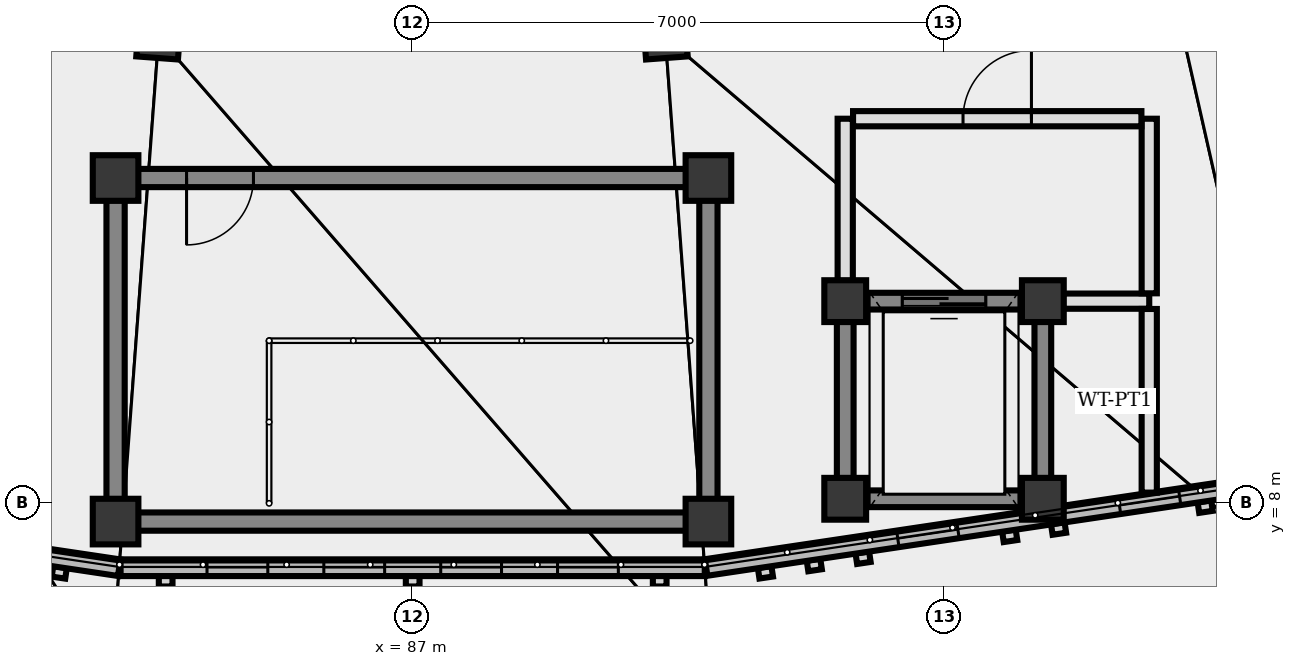
"""IFC4 building model, lengths in metres.
Left out: names, types, materials, properties, quantities, classifications, styles, units other than length and angle.
Written with IfcOpenShell. Run it as: python <this file> out.ifc"""

import sys

from ifc_helpers import new_model, si_unit, direction, frame, frame_2d, origin, origin_2d, place, context, subcontext, project, spatial, rectangle, extrude, element, fill, save


model = new_model("IFC4")
c1 = context("Model", 3, precision=1e-05, world=origin(), true_north=direction((0.0, 1.0)))
c2 = subcontext(c1, "Body", "Model", "MODEL_VIEW")
j1 = project(units=[si_unit("LENGTHUNIT", "METRE"), si_unit("PLANEANGLEUNIT", "RADIAN")], contexts=[c1])
p1 = place(None, origin())
s1 = spatial("IfcSite", under=j1, at=p1, CompositionType="ELEMENT")
p2 = place(p1, origin())
s2 = spatial("IfcBuilding", under=s1, at=p2, CompositionType="ELEMENT")
p3 = place(p2, frame((0.0, 0.0, 12.5)))
s3 = spatial("IfcBuildingStorey", under=s2, at=p3, CompositionType="ELEMENT", Elevation=12.5)
for number, where, z_axis, x_axis in (
    (1, (83.1, 7.75, 0.0), (0.0, 0.0, 1.0), (1.0, 0.0, 0.0)),
    (2, (90.9, 7.75, 0.0), (0.0, 0.0, 1.0), (1.0, 0.0, 0.0)),
):
    element("IfcColumn", number, at=place(p3, frame(where, z_axis=z_axis, x_axis=x_axis)), inside=s3, PredefinedType="COLUMN", context=c2, shape_type="SweptSolid", body=[
        extrude(rectangle(XDim=0.6, YDim=0.6, at=origin_2d()), origin(), (0.0, 0.0, 1.0), 4.15),
    ])
for number, where, z_axis, x_axis in (
    (3, (90.9, 12.27, 0.0), (0.0, 0.0, 1.0), (1.0, 0.0, 0.0)),
    (4, (83.1, 12.27, 0.0), (0.0, 0.0, 1.0), (1.0, 0.0, 0.0)),
):
    element("IfcColumn", number, at=place(p3, frame(where, z_axis=z_axis, x_axis=x_axis)), inside=s3, PredefinedType="COLUMN", context=c2, shape_type="SweptSolid", body=[
        extrude(rectangle(XDim=0.6, YDim=0.6, at=origin_2d()), origin(), (0.0, 0.0, 1.0), 3.178),
    ])
for number, where, z_axis, x_axis in (
    (5, (92.7, 8.05, 0.0), (0.0, 0.0, 1.0), (1.0, 0.0, 0.0)),
    (6, (95.3, 8.05, 0.0), (0.0, 0.0, 1.0), (1.0, 0.0, 0.0)),
):
    element("IfcColumn", number, at=place(p3, frame(where, z_axis=z_axis, x_axis=x_axis)), inside=s3, PredefinedType="COLUMN", context=c2, shape_type="SweptSolid", body=[
        extrude(rectangle(XDim=0.55, YDim=0.55, at=origin_2d()), origin(), (0.0, 0.0, 1.0), 4.0),
    ])
p4 = place(p3, frame((95.3, 10.65, 0.0), z_axis=(0.0, 0.0, 1.0), x_axis=(1.0, 0.0, 0.0)))
e7 = element("IfcColumn", 7, at=p4, inside=s3, PredefinedType="COLUMN", context=c2, shape_type="SweptSolid", body=[
    extrude(rectangle(XDim=0.55, YDim=0.55, at=origin_2d()), origin(), (0.0, 0.0, 1.0), 3.658),
])
p5 = place(p3, frame((92.7, 10.65, 0.0), z_axis=(0.0, 0.0, 1.0), x_axis=(1.0, 0.0, 0.0)))
e8 = element("IfcColumn", 8, at=p5, inside=s3, PredefinedType="COLUMN", context=c2, shape_type="SweptSolid", body=[
    extrude(rectangle(XDim=0.55, YDim=0.55, at=origin_2d()), origin(), (0.0, 0.0, 1.0), 3.573),
])
for number, where, z_axis, x_axis in (
    (9, (83.667, 14.124, 0.0), (0.0, 0.0, 1.0), (-0.074, -0.997, 0.0)),
    (10, (90.333, 14.124, 0.0), (0.0, 0.0, 1.0), (0.074, -0.997, 0.0)),
):
    element("IfcColumn", number, at=place(p3, frame(where, z_axis=z_axis, x_axis=x_axis)), inside=s3, PredefinedType="COLUMN", context=c2, shape_type="SweptSolid", body=[
        extrude(rectangle(XDim=0.55, YDim=0.55, at=origin_2d()), origin(), (0.0, 0.0, 1.0), 2.64),
    ])
p6 = place(p3, frame((83.148, 7.143, 0.0), z_axis=(0.0, 0.0, 1.0), x_axis=(-0.989027735747, 0.147729949309, 0.0)))
e11 = element("IfcWall", 11, at=p6, inside=s3, PredefinedType="SOLIDWALL", context=c2, shape_type="SweptSolid", body=[
    extrude(rectangle(XDim=7.392, YDim=0.22, at=frame_2d((3.696, 0.0))), origin(), (0.0, 0.0, 1.0), 3.85),
])
p7 = place(p6, frame((1.078, 0.0, 0.85)))
e12 = element("IfcOpeningElement", 12, at=p7, cuts=e11, PredefinedType="OPENING", context=c2, shape_type="SweptSolid", body=[
    extrude(rectangle(XDim=0.8, YDim=1.1, at=frame_2d((0.4, 0.55))), frame((0.0, 0.12, 0.0), z_axis=(0.0, -1.0, 0.0), x_axis=(1.0, 0.0, 0.0)), (0.0, 0.0, 1.0), 0.24),
])
p8 = place(p6, frame((2.557, 0.0, 0.85)))
e13 = element("IfcOpeningElement", 13, at=p8, cuts=e11, PredefinedType="OPENING", context=c2, shape_type="SweptSolid", body=[
    extrude(rectangle(XDim=0.8, YDim=1.1, at=frame_2d((0.4, 0.55))), frame((0.0, 0.12, 0.0), z_axis=(0.0, -1.0, 0.0), x_axis=(1.0, 0.0, 0.0)), (0.0, 0.0, 1.0), 0.24),
])
p9 = place(p6, frame((4.035, 0.0, 0.85)))
e14 = element("IfcOpeningElement", 14, at=p9, cuts=e11, PredefinedType="OPENING", context=c2, shape_type="SweptSolid", body=[
    extrude(rectangle(XDim=0.8, YDim=1.1, at=frame_2d((0.4, 0.55))), frame((0.0, 0.12, 0.0), z_axis=(0.0, -1.0, 0.0), x_axis=(1.0, 0.0, 0.0)), (0.0, 0.0, 1.0), 0.24),
])
p10 = place(p6, frame((5.514, 0.0, 0.85)))
e15 = element("IfcOpeningElement", 15, at=p10, cuts=e11, PredefinedType="OPENING", context=c2, shape_type="SweptSolid", body=[
    extrude(rectangle(XDim=0.8, YDim=1.1, at=frame_2d((0.4, 0.55))), frame((0.0, 0.12, 0.0), z_axis=(0.0, -1.0, 0.0), x_axis=(1.0, 0.0, 0.0)), (0.0, 0.0, 1.0), 0.24),
])
p11 = place(p3, frame((90.852, 7.143, 0.0), z_axis=(0.0, 0.0, 1.0), x_axis=(-1.0, 0.0, 0.0)))
e16 = element("IfcWall", 16, at=p11, inside=s3, PredefinedType="SOLIDWALL", context=c2, shape_type="SweptSolid", body=[
    extrude(rectangle(XDim=7.686, YDim=0.22, at=frame_2d((3.843, 0.0))), origin(), (0.0, 0.0, 1.0), 3.85),
])
p12 = place(p11, frame((1.137, 0.0, 0.85)))
e17 = element("IfcOpeningElement", 17, at=p12, cuts=e16, PredefinedType="OPENING", context=c2, shape_type="SweptSolid", body=[
    extrude(rectangle(XDim=0.8, YDim=1.1, at=frame_2d((0.4, 0.55))), frame((0.0, 0.12, 0.0), z_axis=(0.0, -1.0, 0.0), x_axis=(1.0, 0.0, 0.0)), (0.0, 0.0, 1.0), 0.24),
])
p13 = place(p11, frame((2.674, 0.0, 0.85)))
e18 = element("IfcOpeningElement", 18, at=p13, cuts=e16, PredefinedType="OPENING", context=c2, shape_type="SweptSolid", body=[
    extrude(rectangle(XDim=0.8, YDim=1.1, at=frame_2d((0.4, 0.55))), frame((0.0, 0.12, 0.0), z_axis=(0.0, -1.0, 0.0), x_axis=(1.0, 0.0, 0.0)), (0.0, 0.0, 1.0), 0.24),
])
p14 = place(p11, frame((4.212, 0.0, 0.85)))
e19 = element("IfcOpeningElement", 19, at=p14, cuts=e16, PredefinedType="OPENING", context=c2, shape_type="SweptSolid", body=[
    extrude(rectangle(XDim=0.8, YDim=1.1, at=frame_2d((0.4, 0.55))), frame((0.0, 0.12, 0.0), z_axis=(0.0, -1.0, 0.0), x_axis=(1.0, 0.0, 0.0)), (0.0, 0.0, 1.0), 0.24),
])
p15 = place(p11, frame((5.749, 0.0, 0.85)))
e20 = element("IfcOpeningElement", 20, at=p15, cuts=e16, PredefinedType="OPENING", context=c2, shape_type="SweptSolid", body=[
    extrude(rectangle(XDim=0.8, YDim=1.1, at=frame_2d((0.4, 0.55))), frame((0.0, 0.12, 0.0), z_axis=(0.0, -1.0, 0.0), x_axis=(1.0, 0.0, 0.0)), (0.0, 0.0, 1.0), 0.24),
])
p16 = place(p3, frame((98.163, 8.235, 0.0), z_axis=(0.0, 0.0, 1.0), x_axis=(-0.989032314976, -0.147699288869, 0.0)))
e21 = element("IfcWall", 21, at=p16, inside=s3, PredefinedType="SOLIDWALL", context=c2, shape_type="SweptSolid", body=[
    extrude(rectangle(XDim=7.374, YDim=0.22, at=frame_2d((3.687, 0.0))), origin(), (0.0, 0.0, 1.0), 3.85),
])
p17 = place(p16, frame((1.075, 0.0, 0.85)))
e22 = element("IfcOpeningElement", 22, at=p17, cuts=e21, PredefinedType="OPENING", context=c2, shape_type="SweptSolid", body=[
    extrude(rectangle(XDim=0.8, YDim=1.1, at=frame_2d((0.4, 0.55))), frame((0.0, 0.12, 0.0), z_axis=(0.0, -1.0, 0.0), x_axis=(1.0, 0.0, 0.0)), (0.0, 0.0, 1.0), 0.24),
])
p18 = place(p16, frame((4.024, 0.0, 0.85)))
e23 = element("IfcOpeningElement", 23, at=p18, cuts=e21, PredefinedType="OPENING", context=c2, shape_type="SweptSolid", body=[
    extrude(rectangle(XDim=0.8, YDim=1.1, at=frame_2d((0.4, 0.55))), frame((0.0, 0.12, 0.0), z_axis=(0.0, -1.0, 0.0), x_axis=(1.0, 0.0, 0.0)), (0.0, 0.0, 1.0), 0.24),
])
for number, where, z_axis, x_axis in (
    (24, (83.1, 8.042, 0.0), (0.0, 0.0, 1.0), (0.0, 1.0, 0.0)),
    (25, (90.9, 11.978, 0.0), (0.0, 0.0, 1.0), (0.0, -1.0, 0.0)),
):
    element("IfcWall", number, at=place(p3, frame(where, z_axis=z_axis, x_axis=x_axis)), inside=s3, PredefinedType="SHEAR", context=c2, shape_type="SweptSolid", body=[
        extrude(rectangle(XDim=3.936, YDim=0.24, at=frame_2d((1.968, 0.0))), origin(), (0.0, 0.0, 1.0), 3.344),
    ])
p19 = place(p3, frame((90.608, 7.75, 0.0), z_axis=(0.0, 0.0, 1.0), x_axis=(-1.0, 0.0, 0.0)))
e26 = element("IfcWall", 26, at=p19, inside=s3, PredefinedType="SHEAR", context=c2, shape_type="SweptSolid", body=[
    extrude(rectangle(XDim=7.216, YDim=0.24, at=frame_2d((3.608, 0.0))), origin(), (0.0, 0.0, 1.0), 3.74),
])
p20 = place(p3, frame((90.608, 12.27, 0.0), z_axis=(0.0, 0.0, 1.0), x_axis=(-1.0, 0.0, 0.0)))
e27 = element("IfcWall", 27, at=p20, inside=s3, PredefinedType="SHEAR", context=c2, shape_type="SweptSolid", body=[
    extrude(rectangle(XDim=7.216, YDim=0.24, at=frame_2d((3.608, 0.0))), origin(), (0.0, 0.0, 1.0), 3.273),
])
p21 = place(p20, frame((5.694, 0.0, 0.0)))
e28 = element("IfcOpeningElement", 28, at=p21, cuts=e27, PredefinedType="OPENING", context=c2, shape_type="SweptSolid", body=[
    extrude(rectangle(XDim=0.88, YDim=2.1, at=frame_2d((0.44, 1.05))), frame((0.0, 0.13, 0.0), z_axis=(0.0, -1.0, 0.0), x_axis=(1.0, 0.0, 0.0)), (0.0, 0.0, 1.0), 0.26),
])
p22 = place(p3, frame((92.967, 8.05, 0.0), z_axis=(0.0, 0.0, 1.0), x_axis=(1.0, 0.0, 0.0)))
e29 = element("IfcWall", 29, at=p22, inside=s3, PredefinedType="SHEAR", context=c2, shape_type="SweptSolid", body=[
    extrude(rectangle(XDim=2.066, YDim=0.22, at=frame_2d((1.033, 0.0))), origin(), (0.0, 0.0, 1.0), 3.74),
])
p23 = place(p3, frame((95.3, 8.317, 0.0), z_axis=(0.0, 0.0, 1.0), x_axis=(0.0, 1.0, 0.0)))
e30 = element("IfcWall", 30, at=p23, inside=s3, PredefinedType="SHEAR", context=c2, shape_type="SweptSolid", body=[
    extrude(rectangle(XDim=2.066, YDim=0.22, at=frame_2d((1.033, 0.0))), origin(), (0.0, 0.0, 1.0), 3.74),
])
p24 = place(p3, frame((95.033, 10.65, 0.0), z_axis=(0.0, 0.0, 1.0), x_axis=(-1.0, 0.0, 0.0)))
e31 = element("IfcWall", 31, at=p24, inside=s3, PredefinedType="SHEAR", context=c2, shape_type="SweptSolid", body=[
    extrude(rectangle(XDim=2.066, YDim=0.22, at=frame_2d((1.033, 0.0))), origin(), (0.0, 0.0, 1.0), 3.691),
])
p25 = place(p24, frame((0.483, 0.0, 0.0)))
e32 = element("IfcOpeningElement", 32, at=p25, cuts=e31, PredefinedType="OPENING", context=c2, shape_type="SweptSolid", body=[
    extrude(rectangle(XDim=1.1, YDim=2.15, at=frame_2d((0.55, 1.075))), frame((0.0, 0.12, 0.0), z_axis=(0.0, -1.0, 0.0), x_axis=(1.0, 0.0, 0.0)), (0.0, 0.0, 1.0), 0.24),
])
p26 = place(p3, frame((92.7, 10.383, 0.0), z_axis=(0.0, 0.0, 1.0), x_axis=(0.0, -1.0, 0.0)))
e33 = element("IfcWall", 33, at=p26, inside=s3, PredefinedType="SHEAR", context=c2, shape_type="SweptSolid", body=[
    extrude(rectangle(XDim=2.066, YDim=0.22, at=frame_2d((1.033, 0.0))), origin(), (0.0, 0.0, 1.0), 3.74),
])
p27 = place(p3, frame((92.7, 10.917, 0.0), z_axis=(0.0, 0.0, 1.0), x_axis=(0.0, 1.0, 0.0)))
e34 = element("IfcWall", 34, at=p27, inside=s3, PredefinedType="PARTITIONING", context=c2, shape_type="SweptSolid", body=[
    extrude(rectangle(XDim=2.133, YDim=0.2, at=frame_2d((1.066, 0.0))), origin(), (0.0, 0.0, 1.0), 3.145),
])
p28 = place(p3, frame((95.567, 10.65, 0.0), z_axis=(0.0, 0.0, 1.0), x_axis=(1.0, 0.0, 0.0)))
e35 = element("IfcWall", 35, at=p28, inside=s3, PredefinedType="PARTITIONING", context=c2, shape_type="SweptSolid", body=[
    extrude(rectangle(XDim=1.133, YDim=0.2, at=frame_2d((0.566, 0.0))), origin(), (0.0, 0.0, 1.0), 3.7),
])
p29 = place(p3, frame((96.7, 8.131, 0.0), z_axis=(0.0, 0.0, 1.0), x_axis=(0.0, 1.0, 0.0)))
e36 = element("IfcWall", 36, at=p29, inside=s3, PredefinedType="PARTITIONING", context=c2, shape_type="SweptSolid", body=[
    extrude(rectangle(XDim=2.416, YDim=0.2, at=frame_2d((1.208, 0.0))), origin(), (0.0, 0.0, 1.0), 3.7),
])
p30 = place(p3, frame((96.7, 10.753, 0.0), z_axis=(0.0, 0.0, 1.0), x_axis=(0.0, 1.0, 0.0)))
e37 = element("IfcWall", 37, at=p30, inside=s3, PredefinedType="PARTITIONING", context=c2, shape_type="SweptSolid", body=[
    extrude(rectangle(XDim=2.297, YDim=0.2, at=frame_2d((1.148, 0.0))), origin(), (0.0, 0.0, 1.0), 3.294),
])
p31 = place(p3, frame((92.803, 13.05, 0.0), z_axis=(0.0, 0.0, 1.0), x_axis=(1.0, 0.0, 0.0)))
e38 = element("IfcWall", 38, at=p31, inside=s3, PredefinedType="PARTITIONING", context=c2, shape_type="SweptSolid", body=[
    extrude(rectangle(XDim=3.794, YDim=0.2, at=frame_2d((1.897, 0.0))), origin(), (0.0, 0.0, 1.0), 3.147),
])
p32 = place(p31, frame((1.447, 0.0, 0.0)))
e39 = element("IfcOpeningElement", 39, at=p32, cuts=e38, PredefinedType="OPENING", context=c2, shape_type="SweptSolid", body=[
    extrude(rectangle(XDim=0.9, YDim=2.2, at=frame_2d((0.45, 1.1))), frame((0.0, 0.11, 0.0), z_axis=(0.0, -1.0, 0.0), x_axis=(1.0, 0.0, 0.0)), (0.0, 0.0, 1.0), 0.22),
])
p33 = place(p12, origin())
e40 = element("IfcWindow", 40, at=p33, inside=s3, PartitioningType="SINGLE_PANEL", PredefinedType="WINDOW", context=c2, shape_type="SweptSolid", body=[
    extrude(rectangle(XDim=0.8, YDim=1.1, at=frame_2d((0.4, 0.55))), frame((0.0, 0.03, 0.0), z_axis=(0.0, -1.0, 0.0), x_axis=(1.0, 0.0, 0.0)), (0.0, 0.0, 1.0), 0.06),
])
fill(e17, e40)
p34 = place(p13, origin())
e41 = element("IfcWindow", 41, at=p34, inside=s3, PartitioningType="SINGLE_PANEL", PredefinedType="WINDOW", context=c2, shape_type="SweptSolid", body=[
    extrude(rectangle(XDim=0.8, YDim=1.1, at=frame_2d((0.4, 0.55))), frame((0.0, 0.03, 0.0), z_axis=(0.0, -1.0, 0.0), x_axis=(1.0, 0.0, 0.0)), (0.0, 0.0, 1.0), 0.06),
])
fill(e18, e41)
p35 = place(p14, origin())
e42 = element("IfcWindow", 42, at=p35, inside=s3, PartitioningType="SINGLE_PANEL", PredefinedType="WINDOW", context=c2, shape_type="SweptSolid", body=[
    extrude(rectangle(XDim=0.8, YDim=1.1, at=frame_2d((0.4, 0.55))), frame((0.0, 0.03, 0.0), z_axis=(0.0, -1.0, 0.0), x_axis=(1.0, 0.0, 0.0)), (0.0, 0.0, 1.0), 0.06),
])
fill(e19, e42)
p36 = place(p15, origin())
e43 = element("IfcWindow", 43, at=p36, inside=s3, PartitioningType="SINGLE_PANEL", PredefinedType="WINDOW", context=c2, shape_type="SweptSolid", body=[
    extrude(rectangle(XDim=0.8, YDim=1.1, at=frame_2d((0.4, 0.55))), frame((0.0, 0.03, 0.0), z_axis=(0.0, -1.0, 0.0), x_axis=(1.0, 0.0, 0.0)), (0.0, 0.0, 1.0), 0.06),
])
fill(e20, e43)
p37 = place(p17, origin())
e44 = element("IfcWindow", 44, at=p37, inside=s3, PartitioningType="SINGLE_PANEL", PredefinedType="WINDOW", context=c2, shape_type="SweptSolid", body=[
    extrude(rectangle(XDim=0.8, YDim=1.1, at=frame_2d((0.4, 0.55))), frame((0.0, 0.03, 0.0), z_axis=(0.0, -1.0, 0.0), x_axis=(1.0, 0.0, 0.0)), (0.0, 0.0, 1.0), 0.06),
])
fill(e22, e44)
p38 = place(p18, origin())
e45 = element("IfcWindow", 45, at=p38, inside=s3, PartitioningType="SINGLE_PANEL", PredefinedType="WINDOW", context=c2, shape_type="SweptSolid", body=[
    extrude(rectangle(XDim=0.8, YDim=1.1, at=frame_2d((0.4, 0.55))), frame((0.0, 0.03, 0.0), z_axis=(0.0, -1.0, 0.0), x_axis=(1.0, 0.0, 0.0)), (0.0, 0.0, 1.0), 0.06),
])
fill(e23, e45)
p39 = place(p21, origin())
e46 = element("IfcDoor", 46, at=p39, inside=s3, OperationType="SINGLE_SWING_RIGHT", PredefinedType="DOOR", context=c2, shape_type="SweptSolid", body=[
    extrude(rectangle(XDim=0.88, YDim=2.1, at=frame_2d((0.44, 1.05))), frame((0.0, 0.025, 0.0), z_axis=(0.0, -1.0, 0.0), x_axis=(1.0, 0.0, 0.0)), (0.0, 0.0, 1.0), 0.05),
])
fill(e28, e46)
p40 = place(p25, origin())
e47 = element("IfcDoor", 47, at=p40, inside=s3, OperationType="DOUBLE_DOOR_SLIDING", PredefinedType="DOOR", context=c2, shape_type="SweptSolid", body=[
    extrude(rectangle(XDim=1.1, YDim=2.15, at=frame_2d((0.55, 1.075))), frame((0.0, 0.025, 0.0), z_axis=(0.0, -1.0, 0.0), x_axis=(1.0, 0.0, 0.0)), (0.0, 0.0, 1.0), 0.05),
])
fill(e32, e47)
p41 = place(p32, origin())
e48 = element("IfcDoor", 48, at=p41, inside=s3, OperationType="SINGLE_SWING_RIGHT", PredefinedType="DOOR", context=c2, shape_type="SweptSolid", body=[
    extrude(rectangle(XDim=0.9, YDim=2.2, at=frame_2d((0.45, 1.1))), frame((0.0, 0.025, 0.0), z_axis=(0.0, -1.0, 0.0), x_axis=(1.0, 0.0, 0.0)), (0.0, 0.0, 1.0), 0.05),
])
fill(e39, e48)
save(model, sys.argv[1])
